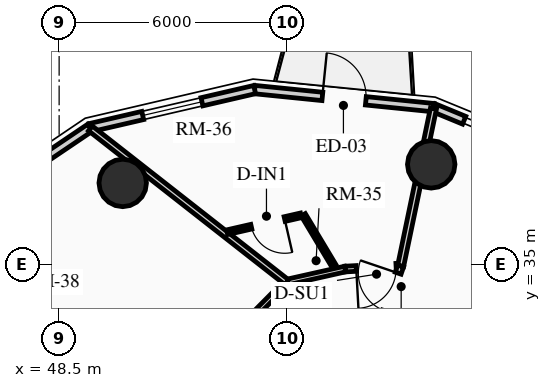
"""IFC4 building model, lengths in metres.
Left out: names, types, materials, properties, quantities, classifications, styles, units other than length and angle.
Written with IfcOpenShell. Run it as: python <this file> out.ifc"""

import sys

from ifc_helpers import new_model, si_unit, direction, frame, frame_2d, origin, origin_2d, place, context, subcontext, project, spatial, rectangle, circle, extrude, source, transform, mapped, element, fill, save


model = new_model("IFC4")
c1 = context("Model", 3, precision=1e-05, world=origin(), true_north=direction((0.0, 1.0)))
c2 = subcontext(c1, "Body", "Model", "MODEL_VIEW")
j1 = project(units=[si_unit("LENGTHUNIT", "METRE"), si_unit("PLANEANGLEUNIT", "RADIAN")], contexts=[c1])
p1 = place(None, origin())
s1 = spatial("IfcSite", under=j1, at=p1, CompositionType="ELEMENT")
p2 = place(p1, origin())
s2 = spatial("IfcBuilding", under=s1, at=p2, CompositionType="ELEMENT")
p3 = place(p2, frame((0.0, 0.0, 180.7)))
s3 = spatial("IfcBuildingStorey", under=s2, at=p3, CompositionType="ELEMENT", Elevation=180.7)
for number, where, z_axis, x_axis in (
    (1, (58.291, 37.635, 0.0), (0.0, 0.0, 1.0), (1.0, 0.0, 0.0)),
    (2, (50.173, 37.146, 0.0), (0.0, 0.0, 1.0), (1.0, 0.0, 0.0)),
):
    element("IfcColumn", number, at=place(p3, frame(where, z_axis=z_axis, x_axis=x_axis)), inside=s3, PredefinedType="USERDEFINED", context=c2, shape_type="SweptSolid", body=[
        extrude(circle(Radius=0.625, at=origin_2d()), origin(), (0.0, 0.0, 1.0), 2.91),
    ])
p4 = place(p3, frame((58.354, 39.127, 0.0), z_axis=(0.0, 0.0, 1.0), x_axis=(0.924556017656, -0.381046152345, 0.0)))
e3 = element("IfcWall", 3, at=p4, inside=s3, PredefinedType="SOLIDWALL", context=c2, shape_type="SweptSolid", body=[
    extrude(rectangle(XDim=0.87, YDim=0.22, at=frame_2d((0.435, 0.0))), origin(), (0.0, 0.0, 1.0), 2.245),
])
p5 = place(p3, frame((53.645, 39.603, 0.0), z_axis=(0.0, 0.0, 1.0), x_axis=(0.994943283129, -0.100438356004, 0.0)))
e4 = element("IfcWall", 4, at=p5, inside=s3, PredefinedType="SOLIDWALL", context=c2, shape_type="SweptSolid", body=[
    extrude(rectangle(XDim=4.733, YDim=0.22, at=frame_2d((2.366, 0.0))), origin(), (0.0, 0.0, 1.0), 2.245),
])
m1 = source(origin(), c2, "Body", "SweptSolid", [
    extrude(rectangle(XDim=1.15, YDim=2.005, at=frame_2d((0.575, 1.002))), frame((0.0, 0.12, 0.0), z_axis=(0.0, -1.0, 0.0), x_axis=(1.0, 0.0, 0.0)), (0.0, 0.0, 1.0), 0.24),
])
p6 = place(p5, frame((1.791, 0.0, 0.0)))
e5 = element("IfcOpeningElement", 5, at=p6, cuts=e4, PredefinedType="OPENING", context=c2, shape_type="MappedRepresentation", body=[
    mapped(m1, transform((0.0, 0.0, 0.0), x_axis=(1.0, 0.0, 0.0), y_axis=(0.0, 1.0, 0.0), z_axis=(0.0, 0.0, 1.0), scale=1.0)),
])
p7 = place(p3, frame((49.313, 38.6, 0.0), z_axis=(0.0, 0.0, 1.0), x_axis=(0.97422620202, 0.22557328587, 0.0)))
e6 = element("IfcWall", 6, at=p7, inside=s3, PredefinedType="SOLIDWALL", context=c2, shape_type="SweptSolid", body=[
    extrude(rectangle(XDim=4.446, YDim=0.22, at=frame_2d((2.223, 0.0))), origin(), (0.0, 0.0, 1.0), 2.245),
])
m2 = source(origin(), c2, "Body", "SweptSolid", [
    extrude(rectangle(XDim=1.6, YDim=1.3, at=frame_2d((0.8, 0.65))), frame((0.0, 0.12, 0.0), z_axis=(0.0, -1.0, 0.0), x_axis=(1.0, 0.0, 0.0)), (0.0, 0.0, 1.0), 0.24),
])
p8 = place(p7, frame((1.423, 0.0, 0.65)))
e7 = element("IfcOpeningElement", 7, at=p8, cuts=e6, PredefinedType="OPENING", context=c2, shape_type="MappedRepresentation", body=[
    mapped(m2, transform((0.0, 0.0, 0.0), x_axis=(1.0, 0.0, 0.0), y_axis=(0.0, 1.0, 0.0), z_axis=(0.0, 0.0, 1.0), scale=1.0)),
])
p9 = place(p3, frame((45.783, 36.217, 0.0), z_axis=(0.0, 0.0, 1.0), x_axis=(0.828817439852, 0.55951912514, 0.0)))
e8 = element("IfcWall", 8, at=p9, inside=s3, PredefinedType="SOLIDWALL", context=c2, shape_type="SweptSolid", body=[
    extrude(rectangle(XDim=4.259, YDim=0.22, at=frame_2d((2.129, 0.0))), origin(), (0.0, 0.0, 1.0), 2.245),
])
p10 = place(p3, frame((57.486, 34.96, 0.0), z_axis=(0.0, 0.0, 1.0), x_axis=(-0.998483871836, -0.055045051404, 0.0)))
e9 = element("IfcWall", 9, at=p10, inside=s3, PredefinedType="PARTITIONING", context=c2, shape_type="SweptSolid", body=[
    extrude(rectangle(XDim=1.464, YDim=0.15, at=frame_2d((0.732, 0.0))), origin(), (0.0, 0.0, 1.0), 2.245),
])
m3 = source(origin(), c2, "Body", "SweptSolid", [
    extrude(rectangle(XDim=1.05, YDim=2.015, at=frame_2d((0.525, 1.007))), frame((0.0, 0.085, 0.0), z_axis=(0.0, -1.0, 0.0), x_axis=(1.0, 0.0, 0.0)), (0.0, 0.0, 1.0), 0.17),
])
p11 = place(p10, frame((0.12, 0.0, 0.0)))
e10 = element("IfcOpeningElement", 10, at=p11, cuts=e9, PredefinedType="OPENING", context=c2, shape_type="MappedRepresentation", body=[
    mapped(m3, transform((0.0, 0.0, 0.0), x_axis=(1.0, 0.0, 0.0), y_axis=(0.0, 1.0, 0.0), z_axis=(0.0, 0.0, 1.0), scale=1.0)),
])
p12 = place(p3, frame((56.025, 34.88, 0.0), z_axis=(0.0, 0.0, 1.0), x_axis=(-0.975729093394, -0.218981132301, 0.0)))
e11 = element("IfcWall", 11, at=p12, inside=s3, PredefinedType="PARTITIONING", context=c2, shape_type="SweptSolid", body=[
    extrude(rectangle(XDim=1.575, YDim=0.15, at=frame_2d((0.788, 0.0))), origin(), (0.0, 0.0, 1.0), 2.245),
])
p13 = place(p3, frame((54.488, 34.535, 0.0), z_axis=(0.0, 0.0, 1.0), x_axis=(-0.703666289339, -0.710530613871, 0.0)))
e12 = element("IfcWall", 12, at=p13, inside=s3, PredefinedType="PARTITIONING", context=c2, shape_type="SweptSolid", body=[
    extrude(rectangle(XDim=3.343, YDim=0.15, at=frame_2d((1.672, 0.0))), origin(), (0.0, 0.0, 1.0), 2.245),
])
p14 = place(p13, frame((1.66, 0.0, 0.0)))
e13 = element("IfcOpeningElement", 13, at=p14, cuts=e12, PredefinedType="OPENING", context=c2, shape_type="MappedRepresentation", body=[
    mapped(m3, transform((0.0, 0.0, 0.0), x_axis=(1.0, 0.0, 0.0), y_axis=(0.0, 1.0, 0.0), z_axis=(0.0, 0.0, 1.0), scale=1.0)),
])
p15 = place(p3, frame((57.486, 34.96, 0.0), z_axis=(0.0, 0.0, 1.0), x_axis=(0.204011788318, 0.978968431681, 0.0)))
e14 = element("IfcWall", 14, at=p15, inside=s3, PredefinedType="PARTITIONING", context=c2, shape_type="SweptSolid", body=[
    extrude(rectangle(XDim=4.236, YDim=0.16, at=frame_2d((2.118, 0.0))), origin(), (0.0, 0.0, 1.0), 2.245),
])
p16 = place(p3, frame((54.488, 34.535, 0.0), z_axis=(0.0, 0.0, 1.0), x_axis=(-0.787155500995, 0.616754584298, 0.0)))
e15 = element("IfcWall", 15, at=p16, inside=s3, PredefinedType="PARTITIONING", context=c2, shape_type="SweptSolid", body=[
    extrude(rectangle(XDim=6.562, YDim=0.16, at=frame_2d((3.281, 0.0))), origin(), (0.0, 0.0, 1.0), 2.245),
])
p17 = place(p3, frame((56.828, 33.021, 0.0), z_axis=(0.0, 0.0, 1.0), x_axis=(0.321300161671, 0.94697740528, 0.0)))
e16 = element("IfcWall", 16, at=p17, inside=s3, PredefinedType="PARTITIONING", context=c2, shape_type="SweptSolid", body=[
    extrude(rectangle(XDim=2.049, YDim=0.16, at=frame_2d((1.024, 0.0))), origin(), (0.0, 0.0, 1.0), 2.245),
])
m4 = source(origin(), c2, "Body", "SweptSolid", [
    extrude(rectangle(XDim=1.05, YDim=2.015, at=frame_2d((0.525, 1.007))), frame((0.0, 0.09, 0.0), z_axis=(0.0, -1.0, 0.0), x_axis=(1.0, 0.0, 0.0)), (0.0, 0.0, 1.0), 0.18),
])
p18 = place(p17, frame((0.798, 0.0, 0.0)))
e17 = element("IfcOpeningElement", 17, at=p18, cuts=e16, PredefinedType="OPENING", context=c2, shape_type="MappedRepresentation", body=[
    mapped(m4, transform((0.0, 0.0, 0.0), x_axis=(1.0, 0.0, 0.0), y_axis=(0.0, 1.0, 0.0), z_axis=(0.0, 0.0, 1.0), scale=1.0)),
])
p19 = place(p3, frame((55.727, 34.97, 0.0), z_axis=(0.0, 0.0, 1.0), x_axis=(-0.514518774568, 0.857479113808, 0.0)))
e18 = element("IfcWall", 18, at=p19, inside=s3, PredefinedType="PARTITIONING", context=c2, shape_type="SweptSolid", body=[
    extrude(rectangle(XDim=1.56, YDim=0.125, at=frame_2d((0.78, 0.0))), origin(), (0.0, 0.0, 1.0), 2.245),
])
p20 = place(p3, frame((54.864, 36.293, 0.0), z_axis=(0.0, 0.0, 1.0), x_axis=(-0.974875983782, -0.222748324896, 0.0)))
e19 = element("IfcWall", 19, at=p20, inside=s3, PredefinedType="PARTITIONING", context=c2, shape_type="SweptSolid", body=[
    extrude(rectangle(XDim=1.994, YDim=0.125, at=frame_2d((0.997, 0.0))), origin(), (0.0, 0.0, 1.0), 2.675),
])
m5 = source(origin(), c2, "Body", "SweptSolid", [
    extrude(rectangle(XDim=0.9, YDim=2.005, at=frame_2d((0.45, 1.002))), frame((0.0, 0.073, 0.0), z_axis=(0.0, -1.0, 0.0), x_axis=(1.0, 0.0, 0.0)), (0.0, 0.0, 1.0), 0.145),
])
p21 = place(p20, frame((0.44, 0.0, 0.0)))
e20 = element("IfcOpeningElement", 20, at=p21, cuts=e19, PredefinedType="OPENING", context=c2, shape_type="MappedRepresentation", body=[
    mapped(m5, transform((0.0, 0.0, 0.0), x_axis=(1.0, 0.0, 0.0), y_axis=(0.0, 1.0, 0.0), z_axis=(0.0, 0.0, 1.0), scale=1.0)),
])
m6 = source(origin(), c2, "Body", "SweptSolid", [
    extrude(rectangle(XDim=1.15, YDim=2.005, at=frame_2d((0.575, 1.002))), frame((0.0, 0.025, 0.0), z_axis=(0.0, -1.0, 0.0), x_axis=(1.0, 0.0, 0.0)), (0.0, 0.0, 1.0), 0.05),
])
p22 = place(p6, origin())
e21 = element("IfcDoor", 21, at=p22, inside=s3, OperationType="SINGLE_SWING_LEFT", PredefinedType="DOOR", context=c2, shape_type="MappedRepresentation", body=[
    mapped(m6, transform((0.0, 0.0, 0.0), x_axis=(1.0, 0.0, 0.0), y_axis=(0.0, 1.0, 0.0), z_axis=(0.0, 0.0, 1.0), scale=1.0)),
])
fill(e5, e21)
m7 = source(origin(), c2, "Body", "SweptSolid", [
    extrude(rectangle(XDim=1.6, YDim=1.3, at=frame_2d((0.8, 0.65))), frame((0.0, 0.03, 0.0), z_axis=(0.0, -1.0, 0.0), x_axis=(1.0, 0.0, 0.0)), (0.0, 0.0, 1.0), 0.06),
])
p23 = place(p8, origin())
e22 = element("IfcWindow", 22, at=p23, inside=s3, PartitioningType="SINGLE_PANEL", PredefinedType="WINDOW", context=c2, shape_type="MappedRepresentation", body=[
    mapped(m7, transform((0.0, 0.0, 0.0), x_axis=(1.0, 0.0, 0.0), y_axis=(0.0, 1.0, 0.0), z_axis=(0.0, 0.0, 1.0), scale=1.0)),
])
fill(e7, e22)
m8 = source(origin(), c2, "Body", "SweptSolid", [
    extrude(rectangle(XDim=1.05, YDim=2.015, at=frame_2d((0.525, 1.007))), frame((0.0, 0.025, 0.0), z_axis=(0.0, -1.0, 0.0), x_axis=(1.0, 0.0, 0.0)), (0.0, 0.0, 1.0), 0.05),
])
p24 = place(p18, origin())
e23 = element("IfcDoor", 23, at=p24, inside=s3, OperationType="SINGLE_SWING_RIGHT", PredefinedType="DOOR", context=c2, shape_type="MappedRepresentation", body=[
    mapped(m8, transform((0.0, 0.0, 0.0), x_axis=(1.0, 0.0, 0.0), y_axis=(0.0, 1.0, 0.0), z_axis=(0.0, 0.0, 1.0), scale=1.0)),
])
fill(e17, e23)
p25 = place(p11, origin())
e24 = element("IfcDoor", 24, at=p25, inside=s3, OperationType="SINGLE_SWING_RIGHT", PredefinedType="DOOR", context=c2, shape_type="MappedRepresentation", body=[
    mapped(m8, transform((0.0, 0.0, 0.0), x_axis=(1.0, 0.0, 0.0), y_axis=(0.0, 1.0, 0.0), z_axis=(0.0, 0.0, 1.0), scale=1.0)),
])
fill(e10, e24)
m9 = source(origin(), c2, "Body", "SweptSolid", [
    extrude(rectangle(XDim=0.9, YDim=2.005, at=frame_2d((0.45, 1.002))), frame((0.0, 0.025, 0.0), z_axis=(0.0, -1.0, 0.0), x_axis=(1.0, 0.0, 0.0)), (0.0, 0.0, 1.0), 0.05),
])
p26 = place(p21, origin())
e25 = element("IfcDoor", 25, at=p26, inside=s3, OperationType="SINGLE_SWING_LEFT", PredefinedType="DOOR", context=c2, shape_type="MappedRepresentation", body=[
    mapped(m9, transform((0.0, 0.0, 0.0), x_axis=(1.0, 0.0, 0.0), y_axis=(0.0, 1.0, 0.0), z_axis=(0.0, 0.0, 1.0), scale=1.0)),
])
fill(e20, e25)
save(model, sys.argv[1])
